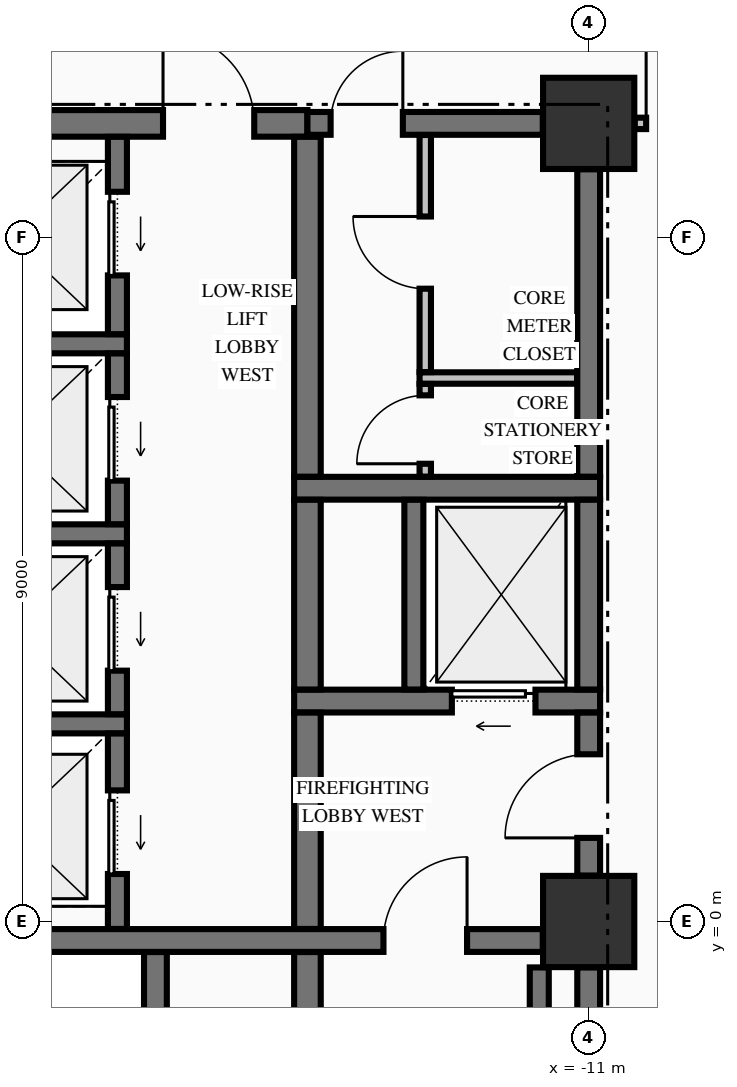
"""IFC4 building model, lengths in metres.
Left out: names, types, materials, properties, quantities, classifications, styles, units other than length and angle.
Written with IfcOpenShell. Run it as: python <this file> out.ifc"""

import sys

from ifc_helpers import new_model, si_unit, direction, frame, frame_2d, origin, origin_2d, place, context, subcontext, project, spatial, rectangle, extrude, element, fill, save


model = new_model("IFC4")
c1 = context("Model", 3, precision=1e-05, world=origin(), true_north=direction((0.0, 1.0)))
c2 = subcontext(c1, "Body", "Model", "MODEL_VIEW")
j1 = project(units=[si_unit("LENGTHUNIT", "METRE"), si_unit("PLANEANGLEUNIT", "RADIAN")], contexts=[c1])
p1 = place(None, origin())
s1 = spatial("IfcSite", under=j1, at=p1, CompositionType="ELEMENT")
p2 = place(p1, origin())
s2 = spatial("IfcBuilding", under=s1, at=p2, CompositionType="ELEMENT")
p3 = place(p2, frame((0.0, 0.0, 41.48)))
s3 = spatial("IfcBuildingStorey", under=s2, at=p3, CompositionType="ELEMENT", Elevation=41.48)
for number, where, z_axis, x_axis in (
    (1, (-11.0, 0.0, -0.25), (0.0, 0.0, 1.0), (1.0, 0.0, 0.0)),
    (2, (-11.0, 10.5, -0.25), (0.0, 0.0, 1.0), (1.0, 0.0, 0.0)),
):
    element("IfcColumn", number, at=place(p3, frame(where, z_axis=z_axis, x_axis=x_axis)), inside=s3, PredefinedType="COLUMN", context=c2, shape_type="SweptSolid", body=[
        extrude(rectangle(XDim=1.2, YDim=1.2, at=origin_2d()), origin(), (0.0, 0.0, 1.0), 3.57),
    ])
p4 = place(p3, frame((-19.396, -0.25, 0.0), z_axis=(0.0, 0.0, 1.0), x_axis=(1.0, 0.0, 0.0)))
e3 = element("IfcWall", 3, at=p4, inside=s3, PredefinedType="SHEAR", context=c2, shape_type="SweptSolid", body=[
    extrude(rectangle(XDim=7.792, YDim=0.3, at=frame_2d((3.896, 0.0))), origin(), (0.0, 0.0, 1.0), 3.32),
])
p5 = place(p4, frame((5.696, 0.0, 0.0)))
e4 = element("IfcOpeningElement", 4, at=p5, cuts=e3, PredefinedType="OPENING", context=c2, shape_type="SweptSolid", body=[
    extrude(rectangle(XDim=1.1, YDim=2.15, at=frame_2d((0.55, 1.075))), frame((0.0, 0.16, 0.0), z_axis=(0.0, -1.0, 0.0), x_axis=(1.0, 0.0, 0.0)), (0.0, 0.0, 1.0), 0.32),
])
p6 = place(p3, frame((-20.175, 2.6, 0.0), z_axis=(0.0, 0.0, 1.0), x_axis=(1.0, 0.0, 0.0)))
e5 = element("IfcWall", 5, at=p6, inside=s3, PredefinedType="SOLIDWALL", context=c2, shape_type="SweptSolid", body=[
    extrude(rectangle(XDim=3.1, YDim=0.25, at=frame_2d((1.55, 0.0))), origin(), (0.0, 0.0, 1.0), 3.32),
])
p7 = place(p3, frame((-14.875, 2.9, 0.0), z_axis=(0.0, 0.0, 1.0), x_axis=(1.0, 0.0, 0.0)))
e6 = element("IfcWall", 6, at=p7, inside=s3, PredefinedType="SHEAR", context=c2, shape_type="SweptSolid", body=[
    extrude(rectangle(XDim=4.025, YDim=0.3, at=frame_2d((2.012, 0.0))), origin(), (0.0, 0.0, 1.0), 3.32),
])
p8 = place(p7, frame((2.075, 0.0, 0.0)))
e7 = element("IfcOpeningElement", 7, at=p8, cuts=e6, PredefinedType="OPENING", context=c2, shape_type="SweptSolid", body=[
    extrude(rectangle(XDim=1.1, YDim=2.2, at=frame_2d((0.55, 1.1))), frame((0.0, 0.16, 0.0), z_axis=(0.0, -1.0, 0.0), x_axis=(1.0, 0.0, 0.0)), (0.0, 0.0, 1.0), 0.32),
])
p9 = place(p3, frame((-20.175, 5.1, 0.0), z_axis=(0.0, 0.0, 1.0), x_axis=(1.0, 0.0, 0.0)))
e8 = element("IfcWall", 8, at=p9, inside=s3, PredefinedType="SOLIDWALL", context=c2, shape_type="SweptSolid", body=[
    extrude(rectangle(XDim=3.1, YDim=0.25, at=frame_2d((1.55, 0.0))), origin(), (0.0, 0.0, 1.0), 3.32),
])
p10 = place(p3, frame((-14.875, 5.7, 0.0), z_axis=(0.0, 0.0, 1.0), x_axis=(1.0, 0.0, 0.0)))
e9 = element("IfcWall", 9, at=p10, inside=s3, PredefinedType="SHEAR", context=c2, shape_type="SweptSolid", body=[
    extrude(rectangle(XDim=4.025, YDim=0.3, at=frame_2d((2.012, 0.0))), origin(), (0.0, 0.0, 1.0), 3.32),
])
p11 = place(p3, frame((-20.175, 7.6, 0.0), z_axis=(0.0, 0.0, 1.0), x_axis=(1.0, 0.0, 0.0)))
e10 = element("IfcWall", 10, at=p11, inside=s3, PredefinedType="SOLIDWALL", context=c2, shape_type="SweptSolid", body=[
    extrude(rectangle(XDim=3.1, YDim=0.25, at=frame_2d((1.55, 0.0))), origin(), (0.0, 0.0, 1.0), 3.32),
])
p12 = place(p3, frame((-19.396, 10.5, 0.0), z_axis=(0.0, 0.0, 1.0), x_axis=(1.0, 0.0, 0.0)))
e11 = element("IfcWall", 11, at=p12, inside=s3, PredefinedType="SHEAR", context=c2, shape_type="SweptSolid", body=[
    extrude(rectangle(XDim=4.696, YDim=0.35, at=frame_2d((2.348, 0.0))), origin(), (0.0, 0.0, 1.0), 3.32),
])
p13 = place(p12, frame((2.796, 0.0, 0.0)))
e12 = element("IfcOpeningElement", 12, at=p13, cuts=e11, PredefinedType="OPENING", context=c2, shape_type="SweptSolid", body=[
    extrude(rectangle(XDim=1.2, YDim=2.15, at=frame_2d((0.6, 1.075))), frame((0.0, 0.185, 0.0), z_axis=(0.0, -1.0, 0.0), x_axis=(1.0, 0.0, 0.0)), (0.0, 0.0, 1.0), 0.37),
])
p14 = place(p3, frame((-14.7, 10.5, 0.0), z_axis=(0.0, 0.0, 1.0), x_axis=(1.0, 0.0, 0.0)))
e13 = element("IfcWall", 13, at=p14, inside=s3, PredefinedType="SHEAR", context=c2, shape_type="SweptSolid", body=[
    extrude(rectangle(XDim=3.096, YDim=0.3, at=frame_2d((1.548, 0.0))), origin(), (0.0, 0.0, 1.0), 3.32),
])
p15 = place(p14, frame((0.305, 0.0, 0.0)))
e14 = element("IfcOpeningElement", 14, at=p15, cuts=e13, PredefinedType="OPENING", context=c2, shape_type="SweptSolid", body=[
    extrude(rectangle(XDim=0.95, YDim=2.15, at=frame_2d((0.475, 1.075))), frame((0.0, 0.16, 0.0), z_axis=(0.0, -1.0, 0.0), x_axis=(1.0, 0.0, 0.0)), (0.0, 0.0, 1.0), 0.32),
])
p16 = place(p3, frame((-13.225, 7.15, 0.0), z_axis=(0.0, 0.0, 1.0), x_axis=(1.0, 0.0, 0.0)))
e15 = element("IfcWall", 15, at=p16, inside=s3, PredefinedType="PARTITIONING", context=c2, shape_type="SweptSolid", body=[
    extrude(rectangle(XDim=2.072, YDim=0.15, at=frame_2d((1.036, 0.0))), origin(), (0.0, 0.0, 1.0), 3.32),
])
p17 = place(p3, frame((-10.394, 10.5, 0.0), z_axis=(0.0, 0.0, 1.0), x_axis=(1.0, 0.0, 0.0)))
e16 = element("IfcWall", 16, at=p17, inside=s3, PredefinedType="PARTITIONING", context=c2, shape_type="SweptSolid", body=[
    extrude(rectangle(XDim=20.788, YDim=0.15, at=frame_2d((10.394, 0.0))), origin(), (0.0, 0.0, 1.0), 3.32),
])
p18 = place(p17, frame((0.15, 0.0, 0.0)))
e17 = element("IfcOpeningElement", 17, at=p18, cuts=e16, PredefinedType="OPENING", context=c2, shape_type="SweptSolid", body=[
    extrude(rectangle(XDim=1.05, YDim=2.15, at=frame_2d((0.525, 1.075))), frame((0.0, 0.085, 0.0), z_axis=(0.0, -1.0, 0.0), x_axis=(1.0, 0.0, 0.0)), (0.0, 0.0, 1.0), 0.17),
])
p19 = place(p17, frame((19.588, 0.0, 0.0)))
e18 = element("IfcOpeningElement", 18, at=p19, cuts=e16, PredefinedType="OPENING", context=c2, shape_type="SweptSolid", body=[
    extrude(rectangle(XDim=1.05, YDim=2.15, at=frame_2d((0.525, 1.075))), frame((0.0, 0.085, 0.0), z_axis=(0.0, -1.0, 0.0), x_axis=(1.0, 0.0, 0.0)), (0.0, 0.0, 1.0), 0.17),
])
p20 = place(p3, frame((-17.2, -0.098, 0.0), z_axis=(0.0, 0.0, 1.0), x_axis=(0.0, 1.0, 0.0)))
e19 = element("IfcWall", 19, at=p20, inside=s3, PredefinedType="SOLIDWALL", context=c2, shape_type="SweptSolid", body=[
    extrude(rectangle(XDim=2.571, YDim=0.25, at=frame_2d((1.285, 0.0))), origin(), (0.0, 0.0, 1.0), 3.32),
])
p21 = place(p20, frame((0.723, 0.0, 0.0)))
e20 = element("IfcOpeningElement", 20, at=p21, cuts=e19, PredefinedType="OPENING", context=c2, shape_type="SweptSolid", body=[
    extrude(rectangle(XDim=1.1, YDim=2.2, at=frame_2d((0.55, 1.1))), frame((0.0, 0.135, 0.0), z_axis=(0.0, -1.0, 0.0), x_axis=(1.0, 0.0, 0.0)), (0.0, 0.0, 1.0), 0.27),
])
p22 = place(p3, frame((-17.2, 2.727, 0.0), z_axis=(0.0, 0.0, 1.0), x_axis=(0.0, 1.0, 0.0)))
e21 = element("IfcWall", 21, at=p22, inside=s3, PredefinedType="SOLIDWALL", context=c2, shape_type="SweptSolid", body=[
    extrude(rectangle(XDim=2.246, YDim=0.25, at=frame_2d((1.123, 0.0))), origin(), (0.0, 0.0, 1.0), 3.32),
])
p23 = place(p22, frame((0.573, 0.0, 0.0)))
e22 = element("IfcOpeningElement", 22, at=p23, cuts=e21, PredefinedType="OPENING", context=c2, shape_type="SweptSolid", body=[
    extrude(rectangle(XDim=1.1, YDim=2.2, at=frame_2d((0.55, 1.1))), frame((0.0, 0.135, 0.0), z_axis=(0.0, -1.0, 0.0), x_axis=(1.0, 0.0, 0.0)), (0.0, 0.0, 1.0), 0.27),
])
p24 = place(p3, frame((-17.2, 5.227, 0.0), z_axis=(0.0, 0.0, 1.0), x_axis=(0.0, 1.0, 0.0)))
e23 = element("IfcWall", 23, at=p24, inside=s3, PredefinedType="SOLIDWALL", context=c2, shape_type="SweptSolid", body=[
    extrude(rectangle(XDim=2.246, YDim=0.25, at=frame_2d((1.123, 0.0))), origin(), (0.0, 0.0, 1.0), 3.32),
])
p25 = place(p24, frame((0.573, 0.0, 0.0)))
e24 = element("IfcOpeningElement", 24, at=p25, cuts=e23, PredefinedType="OPENING", context=c2, shape_type="SweptSolid", body=[
    extrude(rectangle(XDim=1.1, YDim=2.2, at=frame_2d((0.55, 1.1))), frame((0.0, 0.135, 0.0), z_axis=(0.0, -1.0, 0.0), x_axis=(1.0, 0.0, 0.0)), (0.0, 0.0, 1.0), 0.27),
])
p26 = place(p3, frame((-17.2, 7.727, 0.0), z_axis=(0.0, 0.0, 1.0), x_axis=(0.0, 1.0, 0.0)))
e25 = element("IfcWall", 25, at=p26, inside=s3, PredefinedType="SOLIDWALL", context=c2, shape_type="SweptSolid", body=[
    extrude(rectangle(XDim=2.596, YDim=0.25, at=frame_2d((1.298, 0.0))), origin(), (0.0, 0.0, 1.0), 3.32),
])
p27 = place(p26, frame((0.773, 0.0, 0.0)))
e26 = element("IfcOpeningElement", 26, at=p27, cuts=e25, PredefinedType="OPENING", context=c2, shape_type="SweptSolid", body=[
    extrude(rectangle(XDim=1.1, YDim=2.2, at=frame_2d((0.55, 1.1))), frame((0.0, 0.135, 0.0), z_axis=(0.0, -1.0, 0.0), x_axis=(1.0, 0.0, 0.0)), (0.0, 0.0, 1.0), 0.27),
])
p28 = place(p3, frame((-16.7, -9.773, 0.0), z_axis=(0.0, 0.0, 1.0), x_axis=(0.0, 1.0, 0.0)))
e27 = element("IfcWall", 27, at=p28, inside=s3, PredefinedType="SHEAR", context=c2, shape_type="SweptSolid", body=[
    extrude(rectangle(XDim=9.371, YDim=0.3, at=frame_2d((4.686, 0.0))), origin(), (0.0, 0.0, 1.0), 3.32),
])
p29 = place(p3, frame((-14.7, -9.773, 0.0), z_axis=(0.0, 0.0, 1.0), x_axis=(0.0, 1.0, 0.0)))
e28 = element("IfcWall", 28, at=p29, inside=s3, PredefinedType="SHEAR", context=c2, shape_type="SweptSolid", body=[
    extrude(rectangle(XDim=9.371, YDim=0.35, at=frame_2d((4.686, 0.0))), origin(), (0.0, 0.0, 1.0), 3.32),
])
p30 = place(p3, frame((-14.7, -0.098, 0.0), z_axis=(0.0, 0.0, 1.0), x_axis=(0.0, 1.0, 0.0)))
e29 = element("IfcWall", 29, at=p30, inside=s3, PredefinedType="SHEAR", context=c2, shape_type="SweptSolid", body=[
    extrude(rectangle(XDim=2.846, YDim=0.35, at=frame_2d((1.423, 0.0))), origin(), (0.0, 0.0, 1.0), 3.32),
])
p31 = place(p3, frame((-14.7, 3.052, 0.0), z_axis=(0.0, 0.0, 1.0), x_axis=(0.0, 1.0, 0.0)))
e30 = element("IfcWall", 30, at=p31, inside=s3, PredefinedType="SHEAR", context=c2, shape_type="SweptSolid", body=[
    extrude(rectangle(XDim=2.496, YDim=0.35, at=frame_2d((1.248, 0.0))), origin(), (0.0, 0.0, 1.0), 3.32),
])
p32 = place(p3, frame((-14.7, 5.852, 0.0), z_axis=(0.0, 0.0, 1.0), x_axis=(0.0, 1.0, 0.0)))
e31 = element("IfcWall", 31, at=p32, inside=s3, PredefinedType="SHEAR", context=c2, shape_type="SweptSolid", body=[
    extrude(rectangle(XDim=4.471, YDim=0.35, at=frame_2d((2.235, 0.0))), origin(), (0.0, 0.0, 1.0), 3.32),
])
p33 = place(p3, frame((-13.3, 3.052, 0.0), z_axis=(0.0, 0.0, 1.0), x_axis=(0.0, 1.0, 0.0)))
e32 = element("IfcWall", 32, at=p33, inside=s3, PredefinedType="SOLIDWALL", context=c2, shape_type="SweptSolid", body=[
    extrude(rectangle(XDim=2.496, YDim=0.25, at=frame_2d((1.248, 0.0))), origin(), (0.0, 0.0, 1.0), 3.32),
])
p34 = place(p3, frame((-11.65, -9.346, 0.0), z_axis=(0.0, 0.0, 1.0), x_axis=(0.0, 1.0, 0.0)))
e33 = element("IfcWall", 33, at=p34, inside=s3, PredefinedType="SOLIDWALL", context=c2, shape_type="SweptSolid", body=[
    extrude(rectangle(XDim=8.742, YDim=0.25, at=frame_2d((4.371, 0.0))), origin(), (0.0, 0.0, 1.0), 3.32),
])
p35 = place(p3, frame((-11.0, -9.346, 0.0), z_axis=(0.0, 0.0, 1.0), x_axis=(0.0, 1.0, 0.0)))
e34 = element("IfcWall", 34, at=p35, inside=s3, PredefinedType="SHEAR", context=c2, shape_type="SweptSolid", body=[
    extrude(rectangle(XDim=8.742, YDim=0.3, at=frame_2d((4.371, 0.0))), origin(), (0.0, 0.0, 1.0), 3.32),
])
p36 = place(p3, frame((-11.0, 0.604, 0.0), z_axis=(0.0, 0.0, 1.0), x_axis=(0.0, 1.0, 0.0)))
e35 = element("IfcWall", 35, at=p36, inside=s3, PredefinedType="SHEAR", context=c2, shape_type="SweptSolid", body=[
    extrude(rectangle(XDim=2.144, YDim=0.3, at=frame_2d((1.072, 0.0))), origin(), (0.0, 0.0, 1.0), 3.32),
])
p37 = place(p36, frame((0.496, 0.0, 0.0)))
e36 = element("IfcOpeningElement", 36, at=p37, cuts=e35, PredefinedType="OPENING", context=c2, shape_type="SweptSolid", body=[
    extrude(rectangle(XDim=1.1, YDim=2.15, at=frame_2d((0.55, 1.075))), frame((0.0, 0.16, 0.0), z_axis=(0.0, -1.0, 0.0), x_axis=(1.0, 0.0, 0.0)), (0.0, 0.0, 1.0), 0.32),
])
p38 = place(p3, frame((-11.0, 3.052, 0.0), z_axis=(0.0, 0.0, 1.0), x_axis=(0.0, 1.0, 0.0)))
e37 = element("IfcWall", 37, at=p38, inside=s3, PredefinedType="SHEAR", context=c2, shape_type="SweptSolid", body=[
    extrude(rectangle(XDim=2.496, YDim=0.3, at=frame_2d((1.248, 0.0))), origin(), (0.0, 0.0, 1.0), 3.32),
])
p39 = place(p3, frame((-11.0, 5.852, 0.0), z_axis=(0.0, 0.0, 1.0), x_axis=(0.0, 1.0, 0.0)))
e38 = element("IfcWall", 38, at=p39, inside=s3, PredefinedType="SHEAR", context=c2, shape_type="SweptSolid", body=[
    extrude(rectangle(XDim=4.044, YDim=0.3, at=frame_2d((2.022, 0.0))), origin(), (0.0, 0.0, 1.0), 3.32),
])
p40 = place(p3, frame((-13.15, 5.853, 0.0), z_axis=(0.0, 0.0, 1.0), x_axis=(0.0, 1.0, 0.0)))
e39 = element("IfcWall", 39, at=p40, inside=s3, PredefinedType="PARTITIONING", context=c2, shape_type="SweptSolid", body=[
    extrude(rectangle(XDim=1.219, YDim=0.15, at=frame_2d((0.609, 0.0))), origin(), (0.0, 0.0, 1.0), 3.32),
])
p41 = place(p40, frame((0.169, 0.0, 0.0)))
e40 = element("IfcOpeningElement", 40, at=p41, cuts=e39, PredefinedType="OPENING", context=c2, shape_type="SweptSolid", body=[
    extrude(rectangle(XDim=0.9, YDim=2.15, at=frame_2d((0.45, 1.075))), frame((0.0, 0.085, 0.0), z_axis=(0.0, -1.0, 0.0), x_axis=(1.0, 0.0, 0.0)), (0.0, 0.0, 1.0), 0.17),
])
p42 = place(p3, frame((-13.15, 7.228, 0.0), z_axis=(0.0, 0.0, 1.0), x_axis=(0.0, 1.0, 0.0)))
e41 = element("IfcWall", 41, at=p42, inside=s3, PredefinedType="PARTITIONING", context=c2, shape_type="SweptSolid", body=[
    extrude(rectangle(XDim=3.119, YDim=0.15, at=frame_2d((1.56, 0.0))), origin(), (0.0, 0.0, 1.0), 3.32),
])
p43 = place(p42, frame((1.097, 0.0, 0.0)))
e42 = element("IfcOpeningElement", 42, at=p43, cuts=e41, PredefinedType="OPENING", context=c2, shape_type="SweptSolid", body=[
    extrude(rectangle(XDim=0.95, YDim=2.15, at=frame_2d((0.475, 1.075))), frame((0.0, 0.085, 0.0), z_axis=(0.0, -1.0, 0.0), x_axis=(1.0, 0.0, 0.0)), (0.0, 0.0, 1.0), 0.17),
])
p44 = place(p5, origin())
e43 = element("IfcDoor", 43, at=p44, inside=s3, OperationType="SINGLE_SWING_RIGHT", PredefinedType="DOOR", context=c2, shape_type="SweptSolid", body=[
    extrude(rectangle(XDim=1.1, YDim=2.15, at=frame_2d((0.55, 1.075))), frame((0.0, 0.025, 0.0), z_axis=(0.0, -1.0, 0.0), x_axis=(1.0, 0.0, 0.0)), (0.0, 0.0, 1.0), 0.05),
])
fill(e4, e43)
p45 = place(p37, origin())
e44 = element("IfcDoor", 44, at=p45, inside=s3, OperationType="SINGLE_SWING_LEFT", PredefinedType="DOOR", context=c2, shape_type="SweptSolid", body=[
    extrude(rectangle(XDim=1.1, YDim=2.15, at=frame_2d((0.55, 1.075))), frame((0.0, 0.025, 0.0), z_axis=(0.0, -1.0, 0.0), x_axis=(1.0, 0.0, 0.0)), (0.0, 0.0, 1.0), 0.05),
])
fill(e36, e44)
p46 = place(p8, origin())
e45 = element("IfcDoor", 45, at=p46, inside=s3, OperationType="SLIDING_TO_LEFT", PredefinedType="DOOR", context=c2, shape_type="SweptSolid", body=[
    extrude(rectangle(XDim=1.1, YDim=2.2, at=frame_2d((0.55, 1.1))), frame((0.0, 0.025, 0.0), z_axis=(0.0, -1.0, 0.0), x_axis=(1.0, 0.0, 0.0)), (0.0, 0.0, 1.0), 0.05),
])
fill(e7, e45)
p47 = place(p15, origin())
e46 = element("IfcDoor", 46, at=p47, inside=s3, OperationType="SINGLE_SWING_RIGHT", PredefinedType="DOOR", context=c2, shape_type="SweptSolid", body=[
    extrude(rectangle(XDim=0.95, YDim=2.15, at=frame_2d((0.475, 1.075))), frame((0.0, 0.025, 0.0), z_axis=(0.0, -1.0, 0.0), x_axis=(1.0, 0.0, 0.0)), (0.0, 0.0, 1.0), 0.05),
])
fill(e14, e46)
p48 = place(p41, origin())
e47 = element("IfcDoor", 47, at=p48, inside=s3, OperationType="SINGLE_SWING_LEFT", PredefinedType="DOOR", context=c2, shape_type="SweptSolid", body=[
    extrude(rectangle(XDim=0.9, YDim=2.15, at=frame_2d((0.45, 1.075))), frame((0.0, 0.025, 0.0), z_axis=(0.0, -1.0, 0.0), x_axis=(1.0, 0.0, 0.0)), (0.0, 0.0, 1.0), 0.05),
])
fill(e40, e47)
p49 = place(p43, origin())
e48 = element("IfcDoor", 48, at=p49, inside=s3, OperationType="SINGLE_SWING_RIGHT", PredefinedType="DOOR", context=c2, shape_type="SweptSolid", body=[
    extrude(rectangle(XDim=0.95, YDim=2.15, at=frame_2d((0.475, 1.075))), frame((0.0, 0.025, 0.0), z_axis=(0.0, -1.0, 0.0), x_axis=(1.0, 0.0, 0.0)), (0.0, 0.0, 1.0), 0.05),
])
fill(e42, e48)
p50 = place(p13, origin())
e49 = element("IfcDoor", 49, at=p50, inside=s3, OperationType="SINGLE_SWING_LEFT", PredefinedType="DOOR", context=c2, shape_type="SweptSolid", body=[
    extrude(rectangle(XDim=1.2, YDim=2.15, at=frame_2d((0.6, 1.075))), frame((0.0, 0.025, 0.0), z_axis=(0.0, -1.0, 0.0), x_axis=(1.0, 0.0, 0.0)), (0.0, 0.0, 1.0), 0.05),
])
fill(e12, e49)
p51 = place(p21, origin())
e50 = element("IfcDoor", 50, at=p51, inside=s3, OperationType="SLIDING_TO_LEFT", PredefinedType="DOOR", context=c2, shape_type="SweptSolid", body=[
    extrude(rectangle(XDim=1.1, YDim=2.2, at=frame_2d((0.55, 1.1))), frame((0.0, 0.025, 0.0), z_axis=(0.0, -1.0, 0.0), x_axis=(1.0, 0.0, 0.0)), (0.0, 0.0, 1.0), 0.05),
])
fill(e20, e50)
p52 = place(p23, origin())
e51 = element("IfcDoor", 51, at=p52, inside=s3, OperationType="SLIDING_TO_LEFT", PredefinedType="DOOR", context=c2, shape_type="SweptSolid", body=[
    extrude(rectangle(XDim=1.1, YDim=2.2, at=frame_2d((0.55, 1.1))), frame((0.0, 0.025, 0.0), z_axis=(0.0, -1.0, 0.0), x_axis=(1.0, 0.0, 0.0)), (0.0, 0.0, 1.0), 0.05),
])
fill(e22, e51)
p53 = place(p25, origin())
e52 = element("IfcDoor", 52, at=p53, inside=s3, OperationType="SLIDING_TO_LEFT", PredefinedType="DOOR", context=c2, shape_type="SweptSolid", body=[
    extrude(rectangle(XDim=1.1, YDim=2.2, at=frame_2d((0.55, 1.1))), frame((0.0, 0.025, 0.0), z_axis=(0.0, -1.0, 0.0), x_axis=(1.0, 0.0, 0.0)), (0.0, 0.0, 1.0), 0.05),
])
fill(e24, e52)
p54 = place(p27, origin())
e53 = element("IfcDoor", 53, at=p54, inside=s3, OperationType="SLIDING_TO_LEFT", PredefinedType="DOOR", context=c2, shape_type="SweptSolid", body=[
    extrude(rectangle(XDim=1.1, YDim=2.2, at=frame_2d((0.55, 1.1))), frame((0.0, 0.025, 0.0), z_axis=(0.0, -1.0, 0.0), x_axis=(1.0, 0.0, 0.0)), (0.0, 0.0, 1.0), 0.05),
])
fill(e26, e53)
p55 = place(p18, origin())
e54 = element("IfcDoor", 54, at=p55, inside=s3, OperationType="SINGLE_SWING_LEFT", PredefinedType="DOOR", context=c2, shape_type="SweptSolid", body=[
    extrude(rectangle(XDim=1.05, YDim=2.15, at=frame_2d((0.525, 1.075))), frame((0.0, 0.025, 0.0), z_axis=(0.0, -1.0, 0.0), x_axis=(1.0, 0.0, 0.0)), (0.0, 0.0, 1.0), 0.05),
])
fill(e17, e54)
save(model, sys.argv[1])
